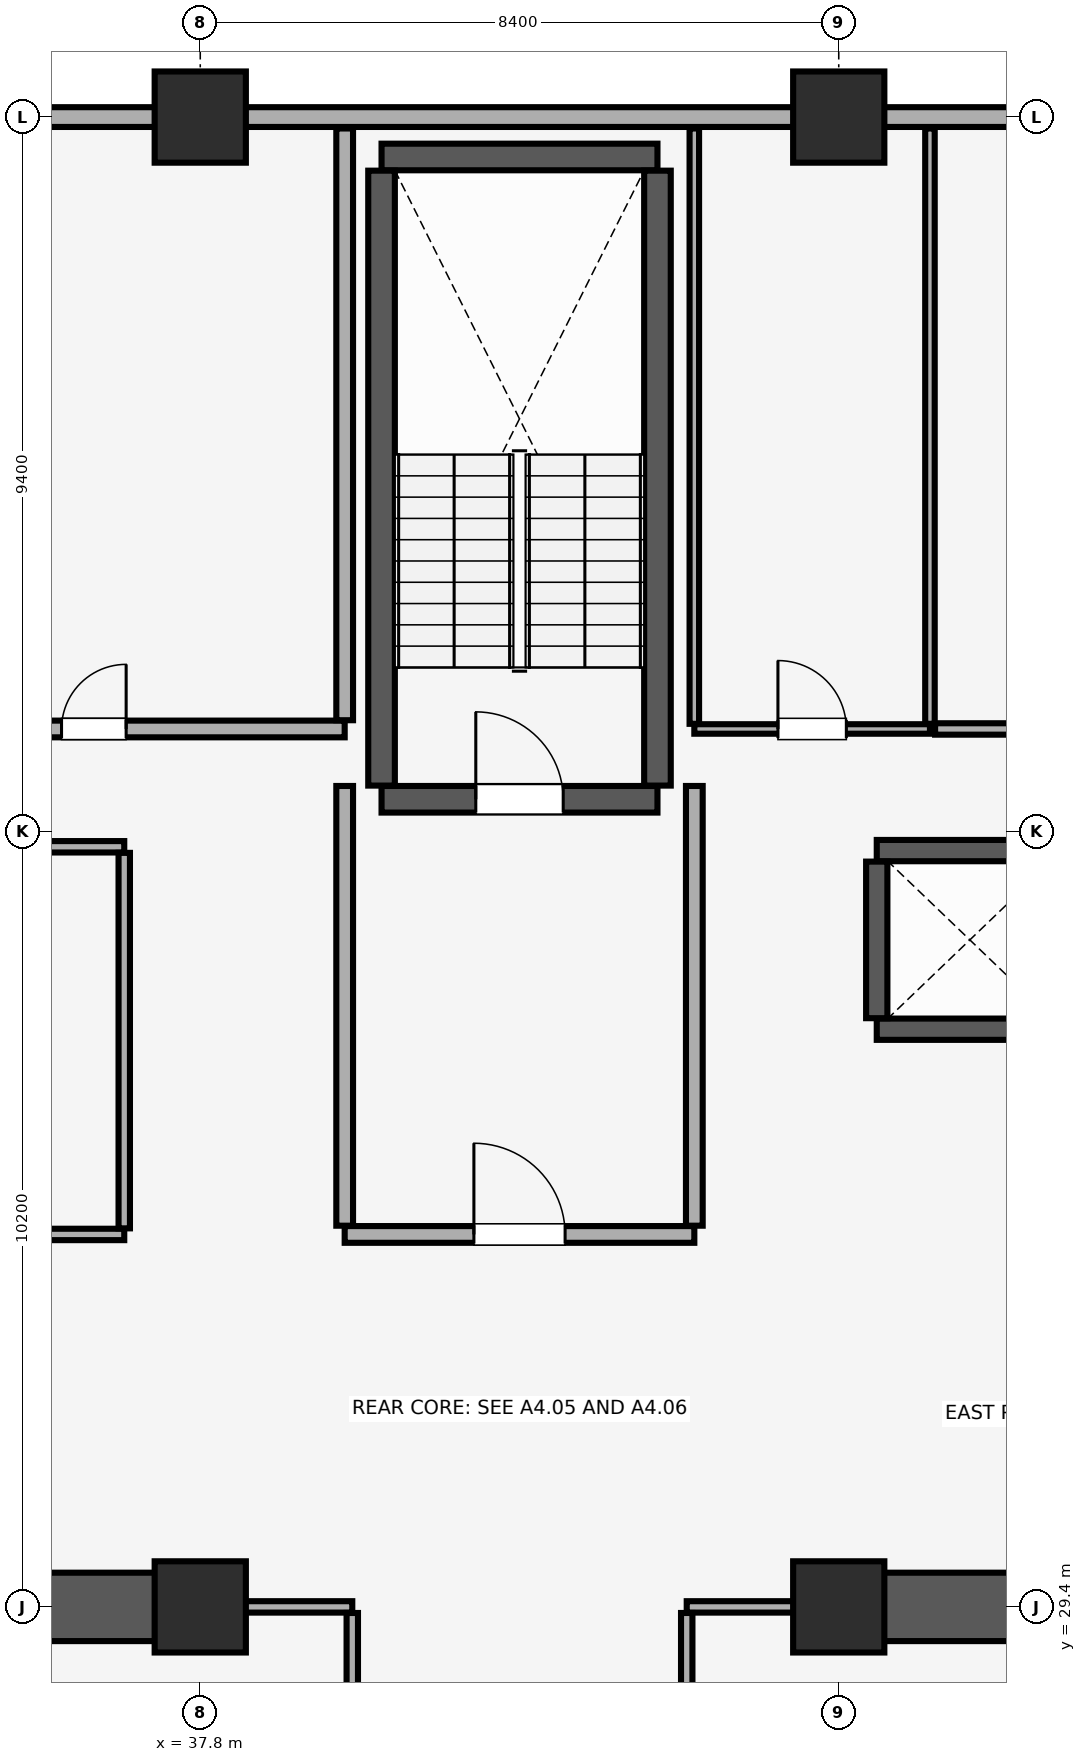
"""IFC4 building model, lengths in metres.
Left out: names, types, materials, properties, quantities, classifications, styles, units other than length and angle.
Written with IfcOpenShell. Run it as: python <this file> out.ifc"""

import sys

from ifc_helpers import new_model, si_unit, direction, frame, frame_2d, origin, origin_2d, place, context, subcontext, project, spatial, rectangle, extrude, element, fill, save


model = new_model("IFC4")
c1 = context("Model", 3, precision=1e-05, world=origin(), true_north=direction((0.0, 1.0)))
c2 = subcontext(c1, "Body", "Model", "MODEL_VIEW")
j1 = project(units=[si_unit("LENGTHUNIT", "METRE"), si_unit("PLANEANGLEUNIT", "RADIAN")], contexts=[c1])
p1 = place(None, origin())
s1 = spatial("IfcSite", under=j1, at=p1, CompositionType="ELEMENT")
p2 = place(p1, origin())
s2 = spatial("IfcBuilding", under=s1, at=p2, CompositionType="ELEMENT")
p3 = place(p2, frame((0.0, 0.0, 104.3)))
s3 = spatial("IfcBuildingStorey", under=s2, at=p3, CompositionType="ELEMENT", Elevation=104.3)
for number, where, z_axis, x_axis in (
    (1, (37.8, 29.4, 0.0), (0.0, 0.0, 1.0), (1.0, 0.0, 0.0)),
    (2, (37.8, 49.0, 0.0), (0.0, 0.0, 1.0), (1.0, 0.0, 0.0)),
    (3, (46.2, 29.4, 0.0), (0.0, 0.0, 1.0), (1.0, 0.0, 0.0)),
    (4, (46.2, 49.0, 0.0), (0.0, 0.0, 1.0), (1.0, 0.0, 0.0)),
):
    element("IfcColumn", number, at=place(p3, frame(where, z_axis=z_axis, x_axis=x_axis)), inside=s3, PredefinedType="COLUMN", context=c2, shape_type="SweptSolid", body=[
        extrude(rectangle(XDim=1.2, YDim=1.2, at=origin_2d()), origin(), (0.0, 0.0, 1.0), 3.51),
    ])
p4 = place(p3, frame((79.8, 49.0, 0.0), z_axis=(0.0, 0.0, 1.0), x_axis=(-1.0, 0.0, 0.0)))
e5 = element("IfcWall", 5, at=p4, inside=s3, PredefinedType="SOLIDWALL", context=c2, shape_type="SweptSolid", body=[
    extrude(rectangle(XDim=75.6, YDim=0.26, at=frame_2d((37.8, 0.0))), origin(), (0.0, 0.0, 1.0), 2.56),
])
p5 = place(p4, frame((72.565, 0.0, 0.85)))
e6 = element("IfcOpeningElement", 6, at=p5, cuts=e5, PredefinedType="OPENING", context=c2, shape_type="SweptSolid", body=[
    extrude(rectangle(XDim=1.5, YDim=1.4, at=frame_2d((0.75, 0.7))), frame((0.0, 0.14, 0.0), z_axis=(0.0, -1.0, 0.0), x_axis=(1.0, 0.0, 0.0)), (0.0, 0.0, 1.0), 0.28),
])
p6 = place(p4, frame((67.45, 0.0, 0.85)))
e7 = element("IfcOpeningElement", 7, at=p6, cuts=e5, PredefinedType="OPENING", context=c2, shape_type="SweptSolid", body=[
    extrude(rectangle(XDim=1.5, YDim=1.4, at=frame_2d((0.75, 0.7))), frame((0.0, 0.14, 0.0), z_axis=(0.0, -1.0, 0.0), x_axis=(1.0, 0.0, 0.0)), (0.0, 0.0, 1.0), 0.28),
])
p7 = place(p4, frame((6.65, 0.0, 0.85)))
e8 = element("IfcOpeningElement", 8, at=p7, cuts=e5, PredefinedType="OPENING", context=c2, shape_type="SweptSolid", body=[
    extrude(rectangle(XDim=1.5, YDim=1.4, at=frame_2d((0.75, 0.7))), frame((0.0, 0.14, 0.0), z_axis=(0.0, -1.0, 0.0), x_axis=(1.0, 0.0, 0.0)), (0.0, 0.0, 1.0), 0.28),
])
p8 = place(p4, frame((1.535, 0.0, 0.85)))
e9 = element("IfcOpeningElement", 9, at=p8, cuts=e5, PredefinedType="OPENING", context=c2, shape_type="SweptSolid", body=[
    extrude(rectangle(XDim=1.5, YDim=1.4, at=frame_2d((0.75, 0.7))), frame((0.0, 0.14, 0.0), z_axis=(0.0, -1.0, 0.0), x_axis=(1.0, 0.0, 0.0)), (0.0, 0.0, 1.0), 0.28),
])
p9 = place(p4, frame((51.365, 0.0, 0.9)))
e10 = element("IfcOpeningElement", 10, at=p9, cuts=e5, PredefinedType="OPENING", context=c2, shape_type="SweptSolid", body=[
    extrude(rectangle(XDim=1.5, YDim=1.4, at=frame_2d((0.75, 0.7))), frame((0.0, 0.14, 0.0), z_axis=(0.0, -1.0, 0.0), x_axis=(1.0, 0.0, 0.0)), (0.0, 0.0, 1.0), 0.28),
])
p10 = place(p4, frame((46.0, 0.0, 0.9)))
e11 = element("IfcOpeningElement", 11, at=p10, cuts=e5, PredefinedType="OPENING", context=c2, shape_type="SweptSolid", body=[
    extrude(rectangle(XDim=1.5, YDim=1.4, at=frame_2d((0.75, 0.7))), frame((0.0, 0.14, 0.0), z_axis=(0.0, -1.0, 0.0), x_axis=(1.0, 0.0, 0.0)), (0.0, 0.0, 1.0), 0.28),
])
p11 = place(p4, frame((29.15, 0.0, 0.9)))
e12 = element("IfcOpeningElement", 12, at=p11, cuts=e5, PredefinedType="OPENING", context=c2, shape_type="SweptSolid", body=[
    extrude(rectangle(XDim=1.5, YDim=1.4, at=frame_2d((0.75, 0.7))), frame((0.0, 0.14, 0.0), z_axis=(0.0, -1.0, 0.0), x_axis=(1.0, 0.0, 0.0)), (0.0, 0.0, 1.0), 0.28),
])
p12 = place(p4, frame((23.485, 0.0, 0.9)))
e13 = element("IfcOpeningElement", 13, at=p12, cuts=e5, PredefinedType="OPENING", context=c2, shape_type="SweptSolid", body=[
    extrude(rectangle(XDim=1.5, YDim=1.4, at=frame_2d((0.75, 0.7))), frame((0.0, 0.14, 0.0), z_axis=(0.0, -1.0, 0.0), x_axis=(1.0, 0.0, 0.0)), (0.0, 0.0, 1.0), 0.28),
])
for number, where, z_axis, x_axis in (
    (14, (30.4, 29.4, 0.0), (0.0, 0.0, 1.0), (1.0, 0.0, 0.0)),
    (15, (46.0, 29.4, 0.0), (0.0, 0.0, 1.0), (1.0, 0.0, 0.0)),
):
    element("IfcWall", number, at=place(p3, frame(where, z_axis=z_axis, x_axis=x_axis)), inside=s3, PredefinedType="SHEAR", context=c2, shape_type="SweptSolid", body=[
        extrude(rectangle(XDim=7.6, YDim=0.9, at=frame_2d((3.8, 0.0))), origin(), (0.0, 0.0, 1.0), 3.51),
    ])
p13 = place(p3, frame((40.185, 40.025, 0.0), z_axis=(0.0, 0.0, 1.0), x_axis=(1.0, 0.0, 0.0)))
e16 = element("IfcWall", 16, at=p13, inside=s3, PredefinedType="SHEAR", context=c2, shape_type="SweptSolid", body=[
    extrude(rectangle(XDim=3.63, YDim=0.35, at=frame_2d((1.815, 0.0))), origin(), (0.0, 0.0, 1.0), 3.51),
])
p14 = place(p13, frame((1.24, 0.0, 0.0)))
e17 = element("IfcOpeningElement", 17, at=p14, cuts=e16, PredefinedType="OPENING", context=c2, shape_type="SweptSolid", body=[
    extrude(rectangle(XDim=1.15, YDim=2.15, at=frame_2d((0.575, 1.075))), frame((0.0, 0.185, 0.0), z_axis=(0.0, -1.0, 0.0), x_axis=(1.0, 0.0, 0.0)), (0.0, 0.0, 1.0), 0.37),
])
p15 = place(p3, frame((40.185, 48.475, 0.0), z_axis=(0.0, 0.0, 1.0), x_axis=(1.0, 0.0, 0.0)))
e18 = element("IfcWall", 18, at=p15, inside=s3, PredefinedType="SHEAR", context=c2, shape_type="SweptSolid", body=[
    extrude(rectangle(XDim=3.63, YDim=0.35, at=frame_2d((1.815, 0.0))), origin(), (0.0, 0.0, 1.0), 3.51),
])
for number, where, z_axis, x_axis in (
    (19, (40.185, 40.205, 0.0), (0.0, 0.0, 1.0), (0.0, 1.0, 0.0)),
    (20, (43.815, 40.205, 0.0), (0.0, 0.0, 1.0), (0.0, 1.0, 0.0)),
):
    element("IfcWall", number, at=place(p3, frame(where, z_axis=z_axis, x_axis=x_axis)), inside=s3, PredefinedType="SHEAR", context=c2, shape_type="SweptSolid", body=[
        extrude(rectangle(XDim=8.09, YDim=0.35, at=frame_2d((4.045, 0.0))), origin(), (0.0, 0.0, 1.0), 3.51),
    ])
for number, where, z_axis, x_axis in (
    (21, (46.7, 37.0, 0.0), (0.0, 0.0, 1.0), (1.0, 0.0, 0.0)),
    (22, (46.7, 39.35, 0.0), (0.0, 0.0, 1.0), (1.0, 0.0, 0.0)),
):
    element("IfcWall", number, at=place(p3, frame(where, z_axis=z_axis, x_axis=x_axis)), inside=s3, PredefinedType="SHEAR", context=c2, shape_type="SweptSolid", body=[
        extrude(rectangle(XDim=2.45, YDim=0.28, at=frame_2d((1.225, 0.0))), origin(), (0.0, 0.0, 1.0), 3.51),
    ])
p16 = place(p3, frame((46.7, 37.145, 0.0), z_axis=(0.0, 0.0, 1.0), x_axis=(0.0, 1.0, 0.0)))
e23 = element("IfcWall", 23, at=p16, inside=s3, PredefinedType="SHEAR", context=c2, shape_type="SweptSolid", body=[
    extrude(rectangle(XDim=2.06, YDim=0.28, at=frame_2d((1.03, 0.0))), origin(), (0.0, 0.0, 1.0), 3.51),
])
p17 = place(p3, frame((39.7, 34.3, 0.0), z_axis=(0.0, 0.0, 1.0), x_axis=(1.0, 0.0, 0.0)))
e24 = element("IfcWall", 24, at=p17, inside=s3, PredefinedType="PARTITIONING", context=c2, shape_type="SweptSolid", body=[
    extrude(rectangle(XDim=4.6, YDim=0.22, at=frame_2d((2.3, 0.0))), origin(), (0.0, 0.0, 1.0), 3.51),
])
p18 = place(p17, frame((1.7, 0.0, 0.0)))
e25 = element("IfcOpeningElement", 25, at=p18, cuts=e24, PredefinedType="OPENING", context=c2, shape_type="SweptSolid", body=[
    extrude(rectangle(XDim=1.2, YDim=2.15, at=frame_2d((0.6, 1.075))), frame((0.0, 0.12, 0.0), z_axis=(0.0, -1.0, 0.0), x_axis=(1.0, 0.0, 0.0)), (0.0, 0.0, 1.0), 0.24),
])
for number, where, z_axis, x_axis in (
    (26, (39.7, 34.415, 0.0), (0.0, 0.0, 1.0), (0.0, 1.0, 0.0)),
    (27, (44.3, 34.415, 0.0), (0.0, 0.0, 1.0), (0.0, 1.0, 0.0)),
):
    element("IfcWall", number, at=place(p3, frame(where, z_axis=z_axis, x_axis=x_axis)), inside=s3, PredefinedType="PARTITIONING", context=c2, shape_type="SweptSolid", body=[
        extrude(rectangle(XDim=5.785, YDim=0.22, at=frame_2d((2.893, 0.0))), origin(), (0.0, 0.0, 1.0), 3.51),
    ])
p19 = place(p3, frame((31.6, 34.3, 0.0), z_axis=(0.0, 0.0, 1.0), x_axis=(1.0, 0.0, 0.0)))
e28 = element("IfcWall", 28, at=p19, inside=s3, PredefinedType="PARTITIONING", context=c2, shape_type="SweptSolid", body=[
    extrude(rectangle(XDim=5.2, YDim=0.15, at=frame_2d((2.6, 0.0))), origin(), (0.0, 0.0, 1.0), 3.51),
])
p20 = place(p19, frame((2.175, 0.0, 0.0)))
e29 = element("IfcOpeningElement", 29, at=p20, cuts=e28, PredefinedType="OPENING", context=c2, shape_type="SweptSolid", body=[
    extrude(rectangle(XDim=0.85, YDim=2.1, at=frame_2d((0.425, 1.05))), frame((0.0, 0.085, 0.0), z_axis=(0.0, -1.0, 0.0), x_axis=(1.0, 0.0, 0.0)), (0.0, 0.0, 1.0), 0.17),
])
p21 = place(p3, frame((31.6, 39.4, 0.0), z_axis=(0.0, 0.0, 1.0), x_axis=(1.0, 0.0, 0.0)))
e30 = element("IfcWall", 30, at=p21, inside=s3, PredefinedType="PARTITIONING", context=c2, shape_type="SweptSolid", body=[
    extrude(rectangle(XDim=5.2, YDim=0.15, at=frame_2d((2.6, 0.0))), origin(), (0.0, 0.0, 1.0), 3.51),
])
p22 = place(p3, frame((36.8, 34.38, 0.0), z_axis=(0.0, 0.0, 1.0), x_axis=(0.0, 1.0, 0.0)))
e31 = element("IfcWall", 31, at=p22, inside=s3, PredefinedType="PARTITIONING", context=c2, shape_type="SweptSolid", body=[
    extrude(rectangle(XDim=4.94, YDim=0.15, at=frame_2d((2.47, 0.0))), origin(), (0.0, 0.0, 1.0), 3.51),
])
p23 = place(p3, frame((35.18, 40.95, 0.0), z_axis=(0.0, 0.0, 1.0), x_axis=(1.0, 0.0, 0.0)))
e32 = element("IfcWall", 32, at=p23, inside=s3, PredefinedType="PARTITIONING", context=c2, shape_type="SweptSolid", body=[
    extrude(rectangle(XDim=4.52, YDim=0.22, at=frame_2d((2.26, 0.0))), origin(), (0.0, 0.0, 1.0), 3.51),
])
p24 = place(p23, frame((0.795, 0.0, 0.0)))
e33 = element("IfcOpeningElement", 33, at=p24, cuts=e32, PredefinedType="OPENING", context=c2, shape_type="SweptSolid", body=[
    extrude(rectangle(XDim=0.85, YDim=2.1, at=frame_2d((0.425, 1.05))), frame((0.0, 0.12, 0.0), z_axis=(0.0, -1.0, 0.0), x_axis=(1.0, 0.0, 0.0)), (0.0, 0.0, 1.0), 0.24),
])
p25 = place(p3, frame((39.7, 41.065, 0.0), z_axis=(0.0, 0.0, 1.0), x_axis=(0.0, 1.0, 0.0)))
e34 = element("IfcWall", 34, at=p25, inside=s3, PredefinedType="PARTITIONING", context=c2, shape_type="SweptSolid", body=[
    extrude(rectangle(XDim=7.785, YDim=0.22, at=frame_2d((3.893, 0.0))), origin(), (0.0, 0.0, 1.0), 3.51),
])
p26 = place(p3, frame((44.3, 40.95, 0.0), z_axis=(0.0, 0.0, 1.0), x_axis=(1.0, 0.0, 0.0)))
e35 = element("IfcWall", 35, at=p26, inside=s3, PredefinedType="PARTITIONING", context=c2, shape_type="SweptSolid", body=[
    extrude(rectangle(XDim=3.1, YDim=0.125, at=frame_2d((1.55, 0.0))), origin(), (0.0, 0.0, 1.0), 3.51),
])
p27 = place(p26, frame((1.1, 0.0, 0.0)))
e36 = element("IfcOpeningElement", 36, at=p27, cuts=e35, PredefinedType="OPENING", context=c2, shape_type="SweptSolid", body=[
    extrude(rectangle(XDim=0.9, YDim=2.1, at=frame_2d((0.45, 1.05))), frame((0.0, 0.073, 0.0), z_axis=(0.0, -1.0, 0.0), x_axis=(1.0, 0.0, 0.0)), (0.0, 0.0, 1.0), 0.145),
])
for number, where, z_axis, x_axis in (
    (37, (44.3, 41.018, 0.0), (0.0, 0.0, 1.0), (0.0, 1.0, 0.0)),
    (38, (47.4, 41.018, 0.0), (0.0, 0.0, 1.0), (0.0, 1.0, 0.0)),
):
    element("IfcWall", number, at=place(p3, frame(where, z_axis=z_axis, x_axis=x_axis)), inside=s3, PredefinedType="PARTITIONING", context=c2, shape_type="SweptSolid", body=[
        extrude(rectangle(XDim=7.833, YDim=0.125, at=frame_2d((3.916, 0.0))), origin(), (0.0, 0.0, 1.0), 3.51),
    ])
p28 = place(p3, frame((47.468, 40.95, 0.0), z_axis=(0.0, 0.0, 1.0), x_axis=(1.0, 0.0, 0.0)))
e39 = element("IfcWall", 39, at=p28, inside=s3, PredefinedType="PARTITIONING", context=c2, shape_type="SweptSolid", body=[
    extrude(rectangle(XDim=4.932, YDim=0.15, at=frame_2d((2.466, 0.0))), origin(), (0.0, 0.0, 1.0), 3.51),
])
p29 = place(p28, frame((2.008, 0.0, 0.0)))
e40 = element("IfcOpeningElement", 40, at=p29, cuts=e39, PredefinedType="OPENING", context=c2, shape_type="SweptSolid", body=[
    extrude(rectangle(XDim=0.85, YDim=2.1, at=frame_2d((0.425, 1.05))), frame((0.0, 0.085, 0.0), z_axis=(0.0, -1.0, 0.0), x_axis=(1.0, 0.0, 0.0)), (0.0, 0.0, 1.0), 0.17),
])
p30 = place(p3, frame((38.01, 29.4, 0.0), z_axis=(0.0, 0.0, 1.0), x_axis=(1.0, 0.0, 0.0)))
e41 = element("IfcWall", 41, at=p30, inside=s3, PredefinedType="PARTITIONING", context=c2, shape_type="SweptSolid", body=[
    extrude(rectangle(XDim=1.79, YDim=0.15, at=frame_2d((0.895, 0.0))), origin(), (0.0, 0.0, 1.0), 2.41),
])
p31 = place(p3, frame((39.8, 23.93, 0.0), z_axis=(0.0, 0.0, 1.0), x_axis=(0.0, 1.0, 0.0)))
e42 = element("IfcWall", 42, at=p31, inside=s3, PredefinedType="PARTITIONING", context=c2, shape_type="SweptSolid", body=[
    extrude(rectangle(XDim=5.39, YDim=0.15, at=frame_2d((2.695, 0.0))), origin(), (0.0, 0.0, 1.0), 3.51),
])
p32 = place(p3, frame((44.2, 29.4, 0.0), z_axis=(0.0, 0.0, 1.0), x_axis=(1.0, 0.0, 0.0)))
e43 = element("IfcWall", 43, at=p32, inside=s3, PredefinedType="PARTITIONING", context=c2, shape_type="SweptSolid", body=[
    extrude(rectangle(XDim=1.79, YDim=0.15, at=frame_2d((0.895, 0.0))), origin(), (0.0, 0.0, 1.0), 2.41),
])
p33 = place(p3, frame((44.2, 23.93, 0.0), z_axis=(0.0, 0.0, 1.0), x_axis=(0.0, 1.0, 0.0)))
e44 = element("IfcWall", 44, at=p33, inside=s3, PredefinedType="PARTITIONING", context=c2, shape_type="SweptSolid", body=[
    extrude(rectangle(XDim=5.39, YDim=0.15, at=frame_2d((2.695, 0.0))), origin(), (0.0, 0.0, 1.0), 3.51),
])
p34 = place(p14, origin())
e45 = element("IfcDoor", 45, at=p34, inside=s3, OperationType="SINGLE_SWING_LEFT", PredefinedType="DOOR", context=c2, shape_type="SweptSolid", body=[
    extrude(rectangle(XDim=1.15, YDim=2.15, at=frame_2d((0.575, 1.075))), frame((0.0, 0.025, 0.0), z_axis=(0.0, -1.0, 0.0), x_axis=(1.0, 0.0, 0.0)), (0.0, 0.0, 1.0), 0.05),
])
fill(e17, e45)
p35 = place(p18, origin())
e46 = element("IfcDoor", 46, at=p35, inside=s3, OperationType="SINGLE_SWING_LEFT", PredefinedType="DOOR", context=c2, shape_type="SweptSolid", body=[
    extrude(rectangle(XDim=1.2, YDim=2.15, at=frame_2d((0.6, 1.075))), frame((0.0, 0.025, 0.0), z_axis=(0.0, -1.0, 0.0), x_axis=(1.0, 0.0, 0.0)), (0.0, 0.0, 1.0), 0.05),
])
fill(e25, e46)
p36 = place(p24, origin())
e47 = element("IfcDoor", 47, at=p36, inside=s3, OperationType="SINGLE_SWING_RIGHT", PredefinedType="DOOR", context=c2, shape_type="SweptSolid", body=[
    extrude(rectangle(XDim=0.85, YDim=2.1, at=frame_2d((0.425, 1.05))), frame((0.0, 0.025, 0.0), z_axis=(0.0, -1.0, 0.0), x_axis=(1.0, 0.0, 0.0)), (0.0, 0.0, 1.0), 0.05),
])
fill(e33, e47)
p37 = place(p27, origin())
e48 = element("IfcDoor", 48, at=p37, inside=s3, OperationType="SINGLE_SWING_LEFT", PredefinedType="DOOR", context=c2, shape_type="SweptSolid", body=[
    extrude(rectangle(XDim=0.9, YDim=2.1, at=frame_2d((0.45, 1.05))), frame((0.0, 0.025, 0.0), z_axis=(0.0, -1.0, 0.0), x_axis=(1.0, 0.0, 0.0)), (0.0, 0.0, 1.0), 0.05),
])
fill(e36, e48)
save(model, sys.argv[1])
